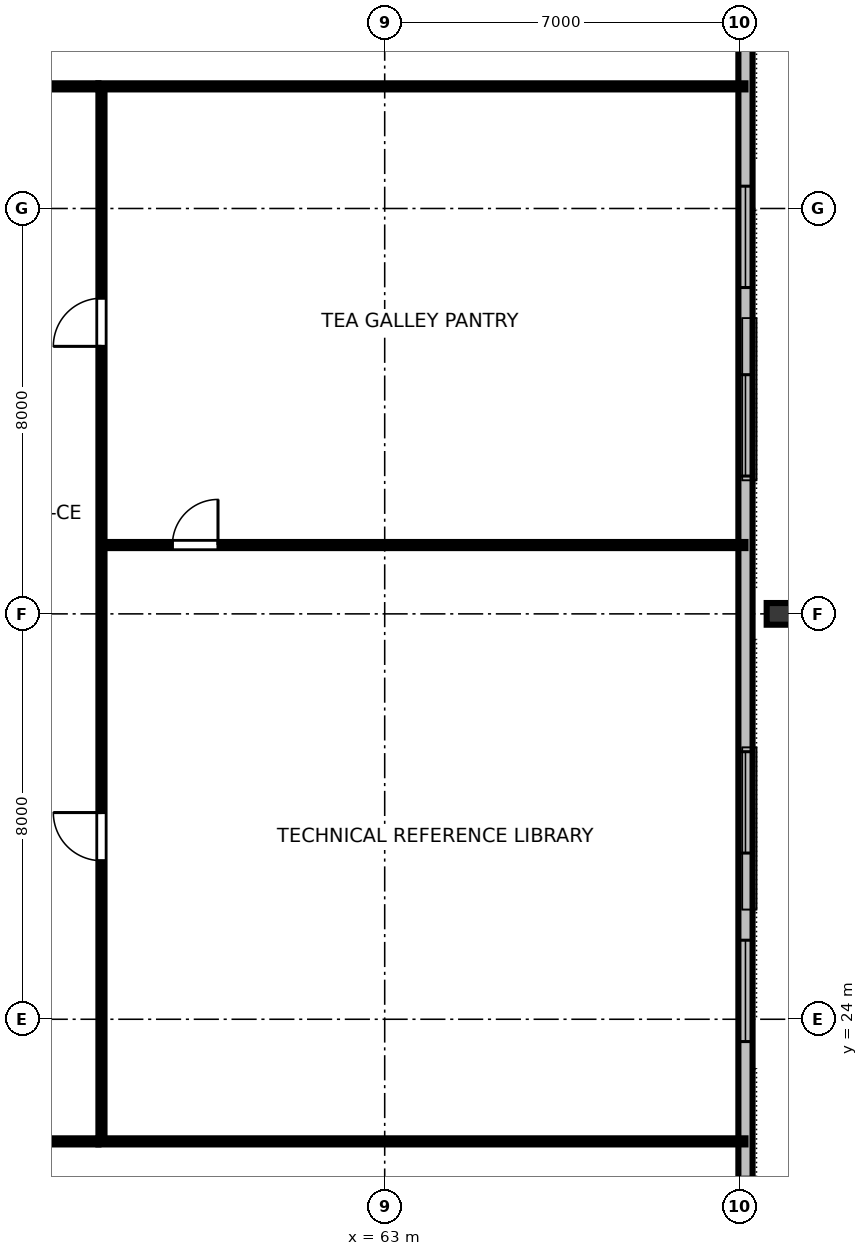
"""IFC4 building model, lengths in metres.
Left out: names, types, materials, properties, quantities, classifications, styles, units other than length and angle.
Written with IfcOpenShell. Run it as: python <this file> out.ifc"""

import sys

from ifc_helpers import new_model, si_unit, direction, frame, frame_2d, origin, origin_2d, place, context, subcontext, project, spatial, rectangle, i_section, extrude, element, fill, save


model = new_model("IFC4")
c1 = context("Model", 3, precision=1e-05, world=origin(), true_north=direction((0.0, 1.0)))
c2 = subcontext(c1, "Body", "Model", "MODEL_VIEW")
j1 = project(units=[si_unit("LENGTHUNIT", "METRE"), si_unit("PLANEANGLEUNIT", "RADIAN")], contexts=[c1])
p1 = place(None, origin())
s1 = spatial("IfcSite", under=j1, at=p1, CompositionType="ELEMENT")
p2 = place(p1, origin())
s2 = spatial("IfcBuilding", under=s1, at=p2, CompositionType="ELEMENT")
p3 = place(p2, frame((0.0, 0.0, 53.2)))
s3 = spatial("IfcBuildingStorey", under=s2, at=p3, CompositionType="ELEMENT", Elevation=53.2)
p4 = place(p3, frame((70.78, 32.0, 0.0), z_axis=(0.0, 0.0, 1.0), x_axis=(0.0, 1.0, 0.0)))
e1 = element("IfcColumn", 1, at=p4, inside=s3, PredefinedType="COLUMN", context=c2, shape_type="SweptSolid", body=[
    extrude(i_section(OverallWidth=0.428, OverallDepth=0.483, WebThickness=0.051, FlangeThickness=0.082, FilletRadius=0.025, at=origin_2d()), origin(), (0.0, 0.0, 1.0), 3.358),
])
p5 = place(p3, frame((70.12, 14.16, 0.0), z_axis=(0.0, 0.0, 1.0), x_axis=(0.0, 1.0, 0.0)))
e2 = element("IfcWall", 2, at=p5, inside=s3, PredefinedType="STANDARD", context=c2, shape_type="SweptSolid", body=[
    extrude(rectangle(XDim=35.68, YDim=0.28, at=frame_2d((17.84, 0.0))), origin(), (0.0, 0.0, 1.0), 3.36),
])
p6 = place(p5, frame((1.96, 0.0, 0.8)))
e3 = element("IfcOpeningElement", 3, at=p6, cuts=e2, PredefinedType="OPENING", context=c2, shape_type="SweptSolid", body=[
    extrude(rectangle(XDim=2.0, YDim=1.95, at=frame_2d((1.0, 0.975))), frame((0.0, 0.15, 0.0), z_axis=(0.0, -1.0, 0.0), x_axis=(1.0, 0.0, 0.0)), (0.0, 0.0, 1.0), 0.3),
])
p7 = place(p5, frame((9.4, 0.0, 0.8)))
e4 = element("IfcOpeningElement", 4, at=p7, cuts=e2, PredefinedType="OPENING", context=c2, shape_type="SweptSolid", body=[
    extrude(rectangle(XDim=2.0, YDim=1.95, at=frame_2d((1.0, 0.975))), frame((0.0, 0.15, 0.0), z_axis=(0.0, -1.0, 0.0), x_axis=(1.0, 0.0, 0.0)), (0.0, 0.0, 1.0), 0.3),
])
p8 = place(p5, frame((13.12, 0.0, 0.8)))
e5 = element("IfcOpeningElement", 5, at=p8, cuts=e2, PredefinedType="OPENING", context=c2, shape_type="SweptSolid", body=[
    extrude(rectangle(XDim=2.0, YDim=1.95, at=frame_2d((1.0, 0.975))), frame((0.0, 0.15, 0.0), z_axis=(0.0, -1.0, 0.0), x_axis=(1.0, 0.0, 0.0)), (0.0, 0.0, 1.0), 0.3),
])
p9 = place(p5, frame((20.56, 0.0, 0.8)))
e6 = element("IfcOpeningElement", 6, at=p9, cuts=e2, PredefinedType="OPENING", context=c2, shape_type="SweptSolid", body=[
    extrude(rectangle(XDim=2.0, YDim=1.95, at=frame_2d((1.0, 0.975))), frame((0.0, 0.15, 0.0), z_axis=(0.0, -1.0, 0.0), x_axis=(1.0, 0.0, 0.0)), (0.0, 0.0, 1.0), 0.3),
])
p10 = place(p5, frame((24.28, 0.0, 0.8)))
e7 = element("IfcOpeningElement", 7, at=p10, cuts=e2, PredefinedType="OPENING", context=c2, shape_type="SweptSolid", body=[
    extrude(rectangle(XDim=2.0, YDim=1.95, at=frame_2d((1.0, 0.975))), frame((0.0, 0.15, 0.0), z_axis=(0.0, -1.0, 0.0), x_axis=(1.0, 0.0, 0.0)), (0.0, 0.0, 1.0), 0.3),
])
p11 = place(p5, frame((31.72, 0.0, 0.8)))
e8 = element("IfcOpeningElement", 8, at=p11, cuts=e2, PredefinedType="OPENING", context=c2, shape_type="SweptSolid", body=[
    extrude(rectangle(XDim=2.0, YDim=1.95, at=frame_2d((1.0, 0.975))), frame((0.0, 0.15, 0.0), z_axis=(0.0, -1.0, 0.0), x_axis=(1.0, 0.0, 0.0)), (0.0, 0.0, 1.0), 0.3),
])
p12 = place(p3, frame((34.65, 21.59, 0.0), z_axis=(0.0, 0.0, 1.0), x_axis=(1.0, 0.0, 0.0)))
e9 = element("IfcWall", 9, at=p12, inside=s3, PredefinedType="PARTITIONING", context=c2, shape_type="SweptSolid", body=[
    extrude(rectangle(XDim=22.7, YDim=0.12, at=frame_2d((11.35, 0.0))), origin(), (0.0, 0.0, 1.0), 2.64),
])
p13 = place(p12, frame((2.045, 0.0, 0.0)))
e10 = element("IfcOpeningElement", 10, at=p13, cuts=e9, PredefinedType="OPENING", context=c2, shape_type="SweptSolid", body=[
    extrude(rectangle(XDim=0.95, YDim=2.15, at=frame_2d((0.475, 1.075))), frame((0.0, 0.07, 0.0), z_axis=(0.0, -1.0, 0.0), x_axis=(1.0, 0.0, 0.0)), (0.0, 0.0, 1.0), 0.14),
])
p14 = place(p12, frame((7.126, 0.0, 0.0)))
e11 = element("IfcOpeningElement", 11, at=p14, cuts=e9, PredefinedType="OPENING", context=c2, shape_type="SweptSolid", body=[
    extrude(rectangle(XDim=0.95, YDim=2.15, at=frame_2d((0.475, 1.075))), frame((0.0, 0.07, 0.0), z_axis=(0.0, -1.0, 0.0), x_axis=(1.0, 0.0, 0.0)), (0.0, 0.0, 1.0), 0.14),
])
p15 = place(p12, frame((11.509, 0.0, 0.0)))
e12 = element("IfcOpeningElement", 12, at=p15, cuts=e9, PredefinedType="OPENING", context=c2, shape_type="SweptSolid", body=[
    extrude(rectangle(XDim=0.95, YDim=2.15, at=frame_2d((0.475, 1.075))), frame((0.0, 0.07, 0.0), z_axis=(0.0, -1.0, 0.0), x_axis=(1.0, 0.0, 0.0)), (0.0, 0.0, 1.0), 0.14),
])
p16 = place(p12, frame((17.638, 0.0, 0.0)))
e13 = element("IfcOpeningElement", 13, at=p16, cuts=e9, PredefinedType="OPENING", context=c2, shape_type="SweptSolid", body=[
    extrude(rectangle(XDim=0.95, YDim=2.15, at=frame_2d((0.475, 1.075))), frame((0.0, 0.07, 0.0), z_axis=(0.0, -1.0, 0.0), x_axis=(1.0, 0.0, 0.0)), (0.0, 0.0, 1.0), 0.14),
])
p17 = place(p3, frame((34.65, 42.41, 0.0), z_axis=(0.0, 0.0, 1.0), x_axis=(1.0, 0.0, 0.0)))
e14 = element("IfcWall", 14, at=p17, inside=s3, PredefinedType="PARTITIONING", context=c2, shape_type="SweptSolid", body=[
    extrude(rectangle(XDim=22.7, YDim=0.12, at=frame_2d((11.35, 0.0))), origin(), (0.0, 0.0, 1.0), 2.64),
])
p18 = place(p17, frame((5.745, 0.0, 0.0)))
e15 = element("IfcOpeningElement", 15, at=p18, cuts=e14, PredefinedType="OPENING", context=c2, shape_type="SweptSolid", body=[
    extrude(rectangle(XDim=0.95, YDim=2.15, at=frame_2d((0.475, 1.075))), frame((0.0, 0.07, 0.0), z_axis=(0.0, -1.0, 0.0), x_axis=(1.0, 0.0, 0.0)), (0.0, 0.0, 1.0), 0.14),
])
p19 = place(p17, frame((16.955, 0.0, 0.0)))
e16 = element("IfcOpeningElement", 16, at=p19, cuts=e14, PredefinedType="OPENING", context=c2, shape_type="SweptSolid", body=[
    extrude(rectangle(XDim=0.95, YDim=2.15, at=frame_2d((0.475, 1.075))), frame((0.0, 0.07, 0.0), z_axis=(0.0, -1.0, 0.0), x_axis=(1.0, 0.0, 0.0)), (0.0, 0.0, 1.0), 0.14),
])
p20 = place(p3, frame((57.41, 33.358, 0.0), z_axis=(0.0, 0.0, 1.0), x_axis=(1.0, 0.0, 0.0)))
e17 = element("IfcWall", 17, at=p20, inside=s3, PredefinedType="PARTITIONING", context=c2, shape_type="SweptSolid", body=[
    extrude(rectangle(XDim=12.71, YDim=0.12, at=frame_2d((6.355, 0.0))), origin(), (0.0, 0.0, 1.0), 2.64),
])
p21 = place(p20, frame((1.4, 0.0, 0.0)))
e18 = element("IfcOpeningElement", 18, at=p21, cuts=e17, PredefinedType="OPENING", context=c2, shape_type="SweptSolid", body=[
    extrude(rectangle(XDim=0.9, YDim=2.15, at=frame_2d((0.45, 1.075))), frame((0.0, 0.07, 0.0), z_axis=(0.0, -1.0, 0.0), x_axis=(1.0, 0.0, 0.0)), (0.0, 0.0, 1.0), 0.14),
])
p22 = place(p3, frame((57.41, 21.65, 0.0), z_axis=(0.0, 0.0, 1.0), x_axis=(0.0, 1.0, 0.0)))
e19 = element("IfcWall", 19, at=p22, inside=s3, PredefinedType="PARTITIONING", context=c2, shape_type="SweptSolid", body=[
    extrude(rectangle(XDim=20.7, YDim=0.12, at=frame_2d((10.35, 0.0))), origin(), (0.0, 0.0, 1.0), 2.64),
])
p23 = place(p22, frame((5.479, 0.0, 0.0)))
e20 = element("IfcOpeningElement", 20, at=p23, cuts=e19, PredefinedType="OPENING", context=c2, shape_type="SweptSolid", body=[
    extrude(rectangle(XDim=0.95, YDim=2.15, at=frame_2d((0.475, 1.075))), frame((0.0, 0.07, 0.0), z_axis=(0.0, -1.0, 0.0), x_axis=(1.0, 0.0, 0.0)), (0.0, 0.0, 1.0), 0.14),
])
p24 = place(p22, frame((15.629, 0.0, 0.0)))
e21 = element("IfcOpeningElement", 21, at=p24, cuts=e19, PredefinedType="OPENING", context=c2, shape_type="SweptSolid", body=[
    extrude(rectangle(XDim=0.95, YDim=2.15, at=frame_2d((0.475, 1.075))), frame((0.0, 0.07, 0.0), z_axis=(0.0, -1.0, 0.0), x_axis=(1.0, 0.0, 0.0)), (0.0, 0.0, 1.0), 0.14),
])
for number, where, z_axis, x_axis in (
    (22, (57.35, 21.59, 0.0), (0.0, 0.0, 1.0), (1.0, 0.0, 0.0)),
    (23, (57.35, 42.41, 0.0), (0.0, 0.0, 1.0), (1.0, 0.0, 0.0)),
):
    element("IfcWall", number, at=place(p3, frame(where, z_axis=z_axis, x_axis=x_axis)), inside=s3, PredefinedType="PARTITIONING", context=c2, shape_type="SweptSolid", body=[
        extrude(rectangle(XDim=12.77, YDim=0.12, at=frame_2d((6.385, 0.0))), origin(), (0.0, 0.0, 1.0), 2.64),
    ])
p25 = place(p7, origin())
e24 = element("IfcWindow", 24, at=p25, inside=s3, PartitioningType="SINGLE_PANEL", PredefinedType="WINDOW", context=c2, shape_type="SweptSolid", body=[
    extrude(rectangle(XDim=2.0, YDim=1.95, at=frame_2d((1.0, 0.975))), frame((0.0, 0.03, 0.0), z_axis=(0.0, -1.0, 0.0), x_axis=(1.0, 0.0, 0.0)), (0.0, 0.0, 1.0), 0.06),
])
fill(e4, e24)
p26 = place(p8, origin())
e25 = element("IfcWindow", 25, at=p26, inside=s3, PartitioningType="SINGLE_PANEL", PredefinedType="WINDOW", context=c2, shape_type="SweptSolid", body=[
    extrude(rectangle(XDim=2.0, YDim=1.95, at=frame_2d((1.0, 0.975))), frame((0.0, 0.03, 0.0), z_axis=(0.0, -1.0, 0.0), x_axis=(1.0, 0.0, 0.0)), (0.0, 0.0, 1.0), 0.06),
])
fill(e5, e25)
p27 = place(p9, origin())
e26 = element("IfcWindow", 26, at=p27, inside=s3, PartitioningType="SINGLE_PANEL", PredefinedType="WINDOW", context=c2, shape_type="SweptSolid", body=[
    extrude(rectangle(XDim=2.0, YDim=1.95, at=frame_2d((1.0, 0.975))), frame((0.0, 0.03, 0.0), z_axis=(0.0, -1.0, 0.0), x_axis=(1.0, 0.0, 0.0)), (0.0, 0.0, 1.0), 0.06),
])
fill(e6, e26)
p28 = place(p10, origin())
e27 = element("IfcWindow", 27, at=p28, inside=s3, PartitioningType="SINGLE_PANEL", PredefinedType="WINDOW", context=c2, shape_type="SweptSolid", body=[
    extrude(rectangle(XDim=2.0, YDim=1.95, at=frame_2d((1.0, 0.975))), frame((0.0, 0.03, 0.0), z_axis=(0.0, -1.0, 0.0), x_axis=(1.0, 0.0, 0.0)), (0.0, 0.0, 1.0), 0.06),
])
fill(e7, e27)
p29 = place(p21, origin())
e28 = element("IfcDoor", 28, at=p29, inside=s3, OperationType="SINGLE_SWING_RIGHT", PredefinedType="DOOR", context=c2, shape_type="SweptSolid", body=[
    extrude(rectangle(XDim=0.9, YDim=2.15, at=frame_2d((0.45, 1.075))), frame((0.0, 0.025, 0.0), z_axis=(0.0, -1.0, 0.0), x_axis=(1.0, 0.0, 0.0)), (0.0, 0.0, 1.0), 0.05),
])
fill(e18, e28)
p30 = place(p23, origin())
e29 = element("IfcDoor", 29, at=p30, inside=s3, OperationType="SINGLE_SWING_RIGHT", PredefinedType="DOOR", context=c2, shape_type="SweptSolid", body=[
    extrude(rectangle(XDim=0.95, YDim=2.15, at=frame_2d((0.475, 1.075))), frame((0.0, 0.025, 0.0), z_axis=(0.0, -1.0, 0.0), x_axis=(1.0, 0.0, 0.0)), (0.0, 0.0, 1.0), 0.05),
])
fill(e20, e29)
p31 = place(p24, origin())
e30 = element("IfcDoor", 30, at=p31, inside=s3, OperationType="SINGLE_SWING_LEFT", PredefinedType="DOOR", context=c2, shape_type="SweptSolid", body=[
    extrude(rectangle(XDim=0.95, YDim=2.15, at=frame_2d((0.475, 1.075))), frame((0.0, 0.025, 0.0), z_axis=(0.0, -1.0, 0.0), x_axis=(1.0, 0.0, 0.0)), (0.0, 0.0, 1.0), 0.05),
])
fill(e21, e30)
save(model, sys.argv[1])
